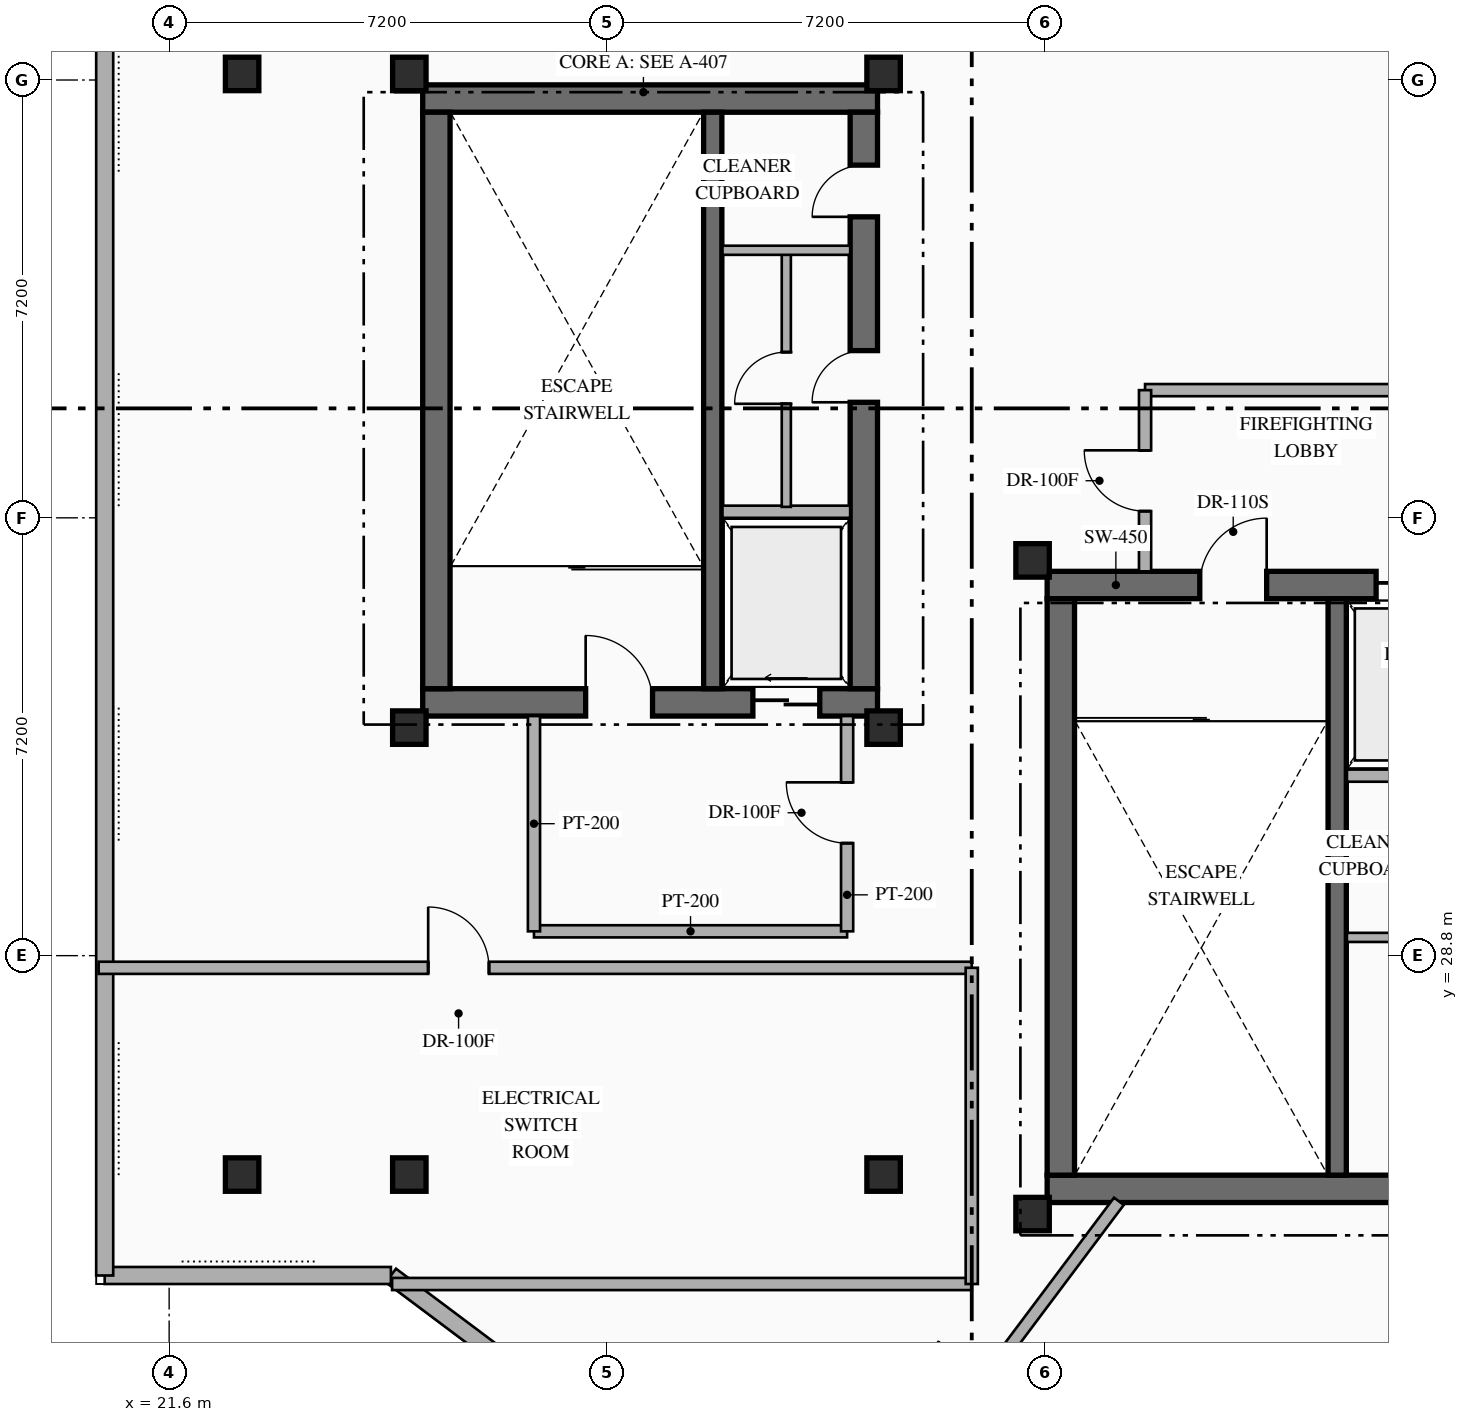
"""IFC4 building model, lengths in metres.
Left out: names, types, materials, properties, quantities, classifications, styles, units other than length and angle.
Written with IfcOpenShell. Run it as: python <this file> out.ifc"""

import sys

from ifc_helpers import new_model, si_unit, direction, frame, frame_2d, origin, origin_2d, place, context, subcontext, project, spatial, rectangle, hollow_rectangle, extrude, element, fill, save


model = new_model("IFC4")
c1 = context("Model", 3, precision=1e-05, world=origin(), true_north=direction((0.0, 1.0)))
c2 = subcontext(c1, "Body", "Model", "MODEL_VIEW")
j1 = project(units=[si_unit("LENGTHUNIT", "METRE"), si_unit("PLANEANGLEUNIT", "RADIAN")], contexts=[c1])
p1 = place(None, origin())
s1 = spatial("IfcSite", under=j1, at=p1, CompositionType="ELEMENT")
p2 = place(p1, origin())
s2 = spatial("IfcBuilding", under=s1, at=p2, CompositionType="ELEMENT")
p3 = place(p2, frame((0.0, 0.0, 289.95)))
s3 = spatial("IfcBuildingStorey", under=s2, at=p3, CompositionType="ELEMENT", Elevation=289.95)
p4 = place(p3, frame((25.77, 32.965, 0.0), z_axis=(0.0, 0.0, 1.0), x_axis=(1.0, 0.0, 0.0)))
e1 = element("IfcWall", 1, at=p4, inside=s3, PredefinedType="SHEAR", context=c2, shape_type="SweptSolid", body=[
    extrude(rectangle(XDim=7.48, YDim=0.45, at=frame_2d((3.74, 0.0))), origin(), (0.0, 0.0, 1.0), 4.2),
])
p5 = place(p4, frame((2.68, 0.0, 0.0)))
e2 = element("IfcOpeningElement", 2, at=p5, cuts=e1, PredefinedType="OPENING", context=c2, shape_type="SweptSolid", body=[
    extrude(rectangle(XDim=1.1, YDim=2.2, at=frame_2d((0.55, 1.1))), frame((0.0, 0.235, 0.0), z_axis=(0.0, -1.0, 0.0), x_axis=(1.0, 0.0, 0.0)), (0.0, 0.0, 1.0), 0.47),
])
p6 = place(p4, frame((5.43, 0.0, 0.0)))
e3 = element("IfcOpeningElement", 3, at=p6, cuts=e1, PredefinedType="OPENING", context=c2, shape_type="SweptSolid", body=[
    extrude(rectangle(XDim=1.1, YDim=2.15, at=frame_2d((0.55, 1.075))), frame((0.0, 0.235, 0.0), z_axis=(0.0, -1.0, 0.0), x_axis=(1.0, 0.0, 0.0)), (0.0, 0.0, 1.0), 0.47),
])
p7 = place(p3, frame((25.77, 42.895, 0.0), z_axis=(0.0, 0.0, 1.0), x_axis=(1.0, 0.0, 0.0)))
e4 = element("IfcWall", 4, at=p7, inside=s3, PredefinedType="SHEAR", context=c2, shape_type="SweptSolid", body=[
    extrude(rectangle(XDim=7.48, YDim=0.45, at=frame_2d((3.74, 0.0))), origin(), (0.0, 0.0, 1.0), 4.2),
])
p8 = place(p3, frame((25.995, 33.19, 0.0), z_axis=(0.0, 0.0, 1.0), x_axis=(0.0, 1.0, 0.0)))
e5 = element("IfcWall", 5, at=p8, inside=s3, PredefinedType="SHEAR", context=c2, shape_type="SweptSolid", body=[
    extrude(rectangle(XDim=9.48, YDim=0.45, at=frame_2d((4.74, 0.0))), origin(), (0.0, 0.0, 1.0), 4.2),
])
p9 = place(p3, frame((33.025, 33.19, 0.0), z_axis=(0.0, 0.0, 1.0), x_axis=(0.0, 1.0, 0.0)))
e6 = element("IfcWall", 6, at=p9, inside=s3, PredefinedType="SHEAR", context=c2, shape_type="SweptSolid", body=[
    extrude(rectangle(XDim=9.48, YDim=0.45, at=frame_2d((4.74, 0.0))), origin(), (0.0, 0.0, 1.0), 4.2),
])
p10 = place(p9, frame((4.71, 0.0, 0.0)))
e7 = element("IfcOpeningElement", 7, at=p10, cuts=e6, PredefinedType="OPENING", context=c2, shape_type="SweptSolid", body=[
    extrude(rectangle(XDim=0.85, YDim=2.08, at=frame_2d((0.425, 1.04))), frame((0.0, 0.235, 0.0), z_axis=(0.0, -1.0, 0.0), x_axis=(1.0, 0.0, 0.0)), (0.0, 0.0, 1.0), 0.47),
])
p11 = place(p9, frame((7.76, 0.0, 0.0)))
e8 = element("IfcOpeningElement", 8, at=p11, cuts=e6, PredefinedType="OPENING", context=c2, shape_type="SweptSolid", body=[
    extrude(rectangle(XDim=0.85, YDim=2.08, at=frame_2d((0.425, 1.04))), frame((0.0, 0.235, 0.0), z_axis=(0.0, -1.0, 0.0), x_axis=(1.0, 0.0, 0.0)), (0.0, 0.0, 1.0), 0.47),
])
p12 = place(p3, frame((30.54, 33.19, 0.0), z_axis=(0.0, 0.0, 1.0), x_axis=(0.0, 1.0, 0.0)))
e9 = element("IfcWall", 9, at=p12, inside=s3, PredefinedType="SHEAR", context=c2, shape_type="SweptSolid", body=[
    extrude(rectangle(XDim=9.48, YDim=0.3, at=frame_2d((4.74, 0.0))), origin(), (0.0, 0.0, 1.0), 4.2),
])
p13 = place(p3, frame((36.04, 24.965, 0.0), z_axis=(0.0, 0.0, 1.0), x_axis=(1.0, 0.0, 0.0)))
e10 = element("IfcWall", 10, at=p13, inside=s3, PredefinedType="SHEAR", context=c2, shape_type="SweptSolid", body=[
    extrude(rectangle(XDim=7.46, YDim=0.45, at=frame_2d((3.73, 0.0))), origin(), (0.0, 0.0, 1.0), 4.2),
])
p14 = place(p3, frame((36.04, 34.895, 0.0), z_axis=(0.0, 0.0, 1.0), x_axis=(1.0, 0.0, 0.0)))
e11 = element("IfcWall", 11, at=p14, inside=s3, PredefinedType="SHEAR", context=c2, shape_type="SweptSolid", body=[
    extrude(rectangle(XDim=7.46, YDim=0.45, at=frame_2d((3.73, 0.0))), origin(), (0.0, 0.0, 1.0), 4.2),
])
p15 = place(p14, frame((2.51, 0.0, 0.0)))
e12 = element("IfcOpeningElement", 12, at=p15, cuts=e11, PredefinedType="OPENING", context=c2, shape_type="SweptSolid", body=[
    extrude(rectangle(XDim=1.1, YDim=2.2, at=frame_2d((0.55, 1.1))), frame((0.0, 0.235, 0.0), z_axis=(0.0, -1.0, 0.0), x_axis=(1.0, 0.0, 0.0)), (0.0, 0.0, 1.0), 0.47),
])
p16 = place(p14, frame((5.41, 0.0, 0.0)))
e13 = element("IfcOpeningElement", 13, at=p16, cuts=e11, PredefinedType="OPENING", context=c2, shape_type="SweptSolid", body=[
    extrude(rectangle(XDim=1.12, YDim=2.15, at=frame_2d((0.56, 1.075))), frame((0.0, 0.235, 0.0), z_axis=(0.0, -1.0, 0.0), x_axis=(1.0, 0.0, 0.0)), (0.0, 0.0, 1.0), 0.47),
])
p17 = place(p3, frame((36.265, 25.19, 0.0), z_axis=(0.0, 0.0, 1.0), x_axis=(0.0, 1.0, 0.0)))
e14 = element("IfcWall", 14, at=p17, inside=s3, PredefinedType="SHEAR", context=c2, shape_type="SweptSolid", body=[
    extrude(rectangle(XDim=9.48, YDim=0.45, at=frame_2d((4.74, 0.0))), origin(), (0.0, 0.0, 1.0), 4.2),
])
p18 = place(p3, frame((40.81, 25.19, 0.0), z_axis=(0.0, 0.0, 1.0), x_axis=(0.0, 1.0, 0.0)))
e15 = element("IfcWall", 15, at=p18, inside=s3, PredefinedType="SHEAR", context=c2, shape_type="SweptSolid", body=[
    extrude(rectangle(XDim=9.48, YDim=0.3, at=frame_2d((4.74, 0.0))), origin(), (0.0, 0.0, 1.0), 4.2),
])
for number, where, z_axis, x_axis in (
    (16, (25.55, 32.55, 0.0), (0.0, 0.0, 1.0), (1.0, 0.0, 0.0)),
    (17, (33.35, 32.55, 0.0), (0.0, 0.0, 1.0), (1.0, 0.0, 0.0)),
    (18, (25.55, 43.3, 0.0), (0.0, 0.0, 1.0), (1.0, 0.0, 0.0)),
    (19, (33.35, 43.3, 0.0), (0.0, 0.0, 1.0), (1.0, 0.0, 0.0)),
    (20, (35.8, 24.55, 0.0), (0.0, 0.0, 1.0), (1.0, 0.0, 0.0)),
    (21, (35.8, 35.3, 0.0), (0.0, 0.0, 1.0), (1.0, 0.0, 0.0)),
    (22, (25.55, 25.2, 0.0), (0.0, 0.0, 1.0), (1.0, 0.0, 0.0)),
    (23, (33.35, 25.2, 0.0), (0.0, 0.0, 1.0), (1.0, 0.0, 0.0)),
    (24, (22.8, 25.2, 0.0), (0.0, 0.0, 1.0), (1.0, 0.0, 0.0)),
    (25, (22.8, 43.3, 0.0), (0.0, 0.0, 1.0), (1.0, 0.0, 0.0)),
):
    element("IfcColumn", number, at=place(p3, frame(where, z_axis=z_axis, x_axis=x_axis)), inside=s3, PredefinedType="COLUMN", context=c2, shape_type="SweptSolid", body=[
        extrude(hollow_rectangle(XDim=0.55, YDim=0.55, WallThickness=0.022, at=origin_2d()), origin(), (0.0, 0.0, 1.0), 3.818),
    ])
p19 = place(p3, frame((52.053, 32.438, 0.0), z_axis=(0.0, 0.0, 1.0), x_axis=(-0.599970072971, -0.800022444397, 0.0)))
e26 = element("IfcWall", 26, at=p19, inside=s3, PredefinedType="STANDARD", context=c2, shape_type="SweptSolid", body=[
    extrude(rectangle(XDim=20.885, YDim=0.28, at=frame_2d((10.442, 0.0))), origin(), (0.0, 0.0, 1.0), 3.85),
])
p20 = place(p3, frame((36.278, 15.267, 0.0), z_axis=(0.0, 0.0, 1.0), x_axis=(-0.80001062348, 0.599985835098, 0.0)))
e27 = element("IfcWall", 27, at=p20, inside=s3, PredefinedType="STANDARD", context=c2, shape_type="SweptSolid", body=[
    extrude(rectangle(XDim=13.789, YDim=0.28, at=frame_2d((6.894, 0.0))), origin(), (0.0, 0.0, 1.0), 3.85),
])
p21 = place(p3, frame((25.247, 23.54, 0.0), z_axis=(0.0, 0.0, 1.0), x_axis=(-1.0, 0.0, 0.0)))
e28 = element("IfcWall", 28, at=p21, inside=s3, PredefinedType="STANDARD", context=c2, shape_type="SweptSolid", body=[
    extrude(rectangle(XDim=4.707, YDim=0.28, at=frame_2d((2.354, 0.0))), origin(), (0.0, 0.0, 1.0), 3.85),
])
p22 = place(p3, frame((20.54, 23.54, 0.0), z_axis=(0.0, 0.0, 1.0), x_axis=(0.0, 1.0, 0.0)))
e29 = element("IfcWall", 29, at=p22, inside=s3, PredefinedType="STANDARD", context=c2, shape_type="SweptSolid", body=[
    extrude(rectangle(XDim=22.002, YDim=0.28, at=frame_2d((11.001, 0.0))), origin(), (0.0, 0.0, 1.0), 3.85),
])
p23 = place(p3, frame((30.7, 36.1, 0.0), z_axis=(0.0, 0.0, 1.0), x_axis=(1.0, 0.0, 0.0)))
e30 = element("IfcWall", 30, at=p23, inside=s3, PredefinedType="STANDARD", context=c2, shape_type="SweptSolid", body=[
    extrude(rectangle(XDim=2.1, YDim=0.2, at=frame_2d((1.05, 0.0))), origin(), (0.0, 0.0, 1.0), 3.85),
])
p24 = place(p3, frame((31.75, 36.18, 0.0), z_axis=(0.0, 0.0, 1.0), x_axis=(0.0, 1.0, 0.0)))
e31 = element("IfcWall", 31, at=p24, inside=s3, PredefinedType="PARTITIONING", context=c2, shape_type="SweptSolid", body=[
    extrude(rectangle(XDim=4.24, YDim=0.15, at=frame_2d((2.12, 0.0))), origin(), (0.0, 0.0, 1.0), 3.85),
])
p25 = place(p24, frame((1.695, 0.0, 0.0)))
e32 = element("IfcOpeningElement", 32, at=p25, cuts=e31, PredefinedType="OPENING", context=c2, shape_type="SweptSolid", body=[
    extrude(rectangle(XDim=0.85, YDim=2.08, at=frame_2d((0.425, 1.04))), frame((0.0, 0.085, 0.0), z_axis=(0.0, -1.0, 0.0), x_axis=(1.0, 0.0, 0.0)), (0.0, 0.0, 1.0), 0.17),
])
p26 = place(p3, frame((30.7, 40.4, 0.0), z_axis=(0.0, 0.0, 1.0), x_axis=(1.0, 0.0, 0.0)))
e33 = element("IfcWall", 33, at=p26, inside=s3, PredefinedType="PARTITIONING", context=c2, shape_type="SweptSolid", body=[
    extrude(rectangle(XDim=2.1, YDim=0.15, at=frame_2d((1.05, 0.0))), origin(), (0.0, 0.0, 1.0), 3.85),
])
p27 = place(p3, frame((40.97, 31.76, 0.0), z_axis=(0.0, 0.0, 1.0), x_axis=(1.0, 0.0, 0.0)))
e34 = element("IfcWall", 34, at=p27, inside=s3, PredefinedType="STANDARD", context=c2, shape_type="SweptSolid", body=[
    extrude(rectangle(XDim=2.08, YDim=0.2, at=frame_2d((1.04, 0.0))), origin(), (0.0, 0.0, 1.0), 3.85),
])
p28 = place(p3, frame((40.97, 29.1, 0.0), z_axis=(0.0, 0.0, 1.0), x_axis=(1.0, 0.0, 0.0)))
e35 = element("IfcWall", 35, at=p28, inside=s3, PredefinedType="PARTITIONING", context=c2, shape_type="SweptSolid", body=[
    extrude(rectangle(XDim=2.08, YDim=0.15, at=frame_2d((1.04, 0.0))), origin(), (0.0, 0.0, 1.0), 3.85),
])
p29 = place(p3, frame((27.6, 29.2, 0.0), z_axis=(0.0, 0.0, 1.0), x_axis=(1.0, 0.0, 0.0)))
e36 = element("IfcWall", 36, at=p29, inside=s3, PredefinedType="STANDARD", context=c2, shape_type="SweptSolid", body=[
    extrude(rectangle(XDim=5.15, YDim=0.2, at=frame_2d((2.575, 0.0))), origin(), (0.0, 0.0, 1.0), 3.85),
])
p30 = place(p3, frame((27.6, 29.2, 0.0), z_axis=(0.0, 0.0, 1.0), x_axis=(0.0, 1.0, 0.0)))
e37 = element("IfcWall", 37, at=p30, inside=s3, PredefinedType="STANDARD", context=c2, shape_type="SweptSolid", body=[
    extrude(rectangle(XDim=3.54, YDim=0.2, at=frame_2d((1.77, 0.0))), origin(), (0.0, 0.0, 1.0), 3.85),
])
p31 = place(p3, frame((32.75, 29.2, 0.0), z_axis=(0.0, 0.0, 1.0), x_axis=(0.0, 1.0, 0.0)))
e38 = element("IfcWall", 38, at=p31, inside=s3, PredefinedType="STANDARD", context=c2, shape_type="SweptSolid", body=[
    extrude(rectangle(XDim=3.54, YDim=0.2, at=frame_2d((1.77, 0.0))), origin(), (0.0, 0.0, 1.0), 3.85),
])
p32 = place(p31, frame((1.45, 0.0, 0.0)))
e39 = element("IfcOpeningElement", 39, at=p32, cuts=e38, PredefinedType="OPENING", context=c2, shape_type="SweptSolid", body=[
    extrude(rectangle(XDim=1.0, YDim=2.2, at=frame_2d((0.5, 1.1))), frame((0.0, 0.11, 0.0), z_axis=(0.0, -1.0, 0.0), x_axis=(1.0, 0.0, 0.0)), (0.0, 0.0, 1.0), 0.22),
])
p33 = place(p3, frame((37.65, 38.1, 0.0), z_axis=(0.0, 0.0, 1.0), x_axis=(1.0, 0.0, 0.0)))
e40 = element("IfcWall", 40, at=p33, inside=s3, PredefinedType="STANDARD", context=c2, shape_type="SweptSolid", body=[
    extrude(rectangle(XDim=5.3, YDim=0.2, at=frame_2d((2.65, 0.0))), origin(), (0.0, 0.0, 1.0), 3.85),
])
p34 = place(p3, frame((37.65, 35.12, 0.0), z_axis=(0.0, 0.0, 1.0), x_axis=(0.0, 1.0, 0.0)))
e41 = element("IfcWall", 41, at=p34, inside=s3, PredefinedType="STANDARD", context=c2, shape_type="SweptSolid", body=[
    extrude(rectangle(XDim=2.98, YDim=0.2, at=frame_2d((1.49, 0.0))), origin(), (0.0, 0.0, 1.0), 3.85),
])
p35 = place(p34, frame((0.99, 0.0, 0.0)))
e42 = element("IfcOpeningElement", 42, at=p35, cuts=e41, PredefinedType="OPENING", context=c2, shape_type="SweptSolid", body=[
    extrude(rectangle(XDim=1.0, YDim=2.2, at=frame_2d((0.5, 1.1))), frame((0.0, 0.11, 0.0), z_axis=(0.0, -1.0, 0.0), x_axis=(1.0, 0.0, 0.0)), (0.0, 0.0, 1.0), 0.22),
])
p36 = place(p3, frame((25.267, 23.4, 0.0), z_axis=(0.0, 0.0, 1.0), x_axis=(1.0, 0.0, 0.0)))
e43 = element("IfcWall", 43, at=p36, inside=s3, PredefinedType="STANDARD", context=c2, shape_type="SweptSolid", body=[
    extrude(rectangle(XDim=9.533, YDim=0.2, at=frame_2d((4.767, 0.0))), origin(), (0.0, 0.0, 1.0), 3.85),
])
p37 = place(p3, frame((20.44, 28.6, 0.0), z_axis=(0.0, 0.0, 1.0), x_axis=(1.0, 0.0, 0.0)))
e44 = element("IfcWall", 44, at=p37, inside=s3, PredefinedType="STANDARD", context=c2, shape_type="SweptSolid", body=[
    extrude(rectangle(XDim=14.36, YDim=0.2, at=frame_2d((7.18, 0.0))), origin(), (0.0, 0.0, 1.0), 3.85),
])
p38 = place(p37, frame((5.42, 0.0, 0.0)))
e45 = element("IfcOpeningElement", 45, at=p38, cuts=e44, PredefinedType="OPENING", context=c2, shape_type="SweptSolid", body=[
    extrude(rectangle(XDim=1.0, YDim=2.2, at=frame_2d((0.5, 1.1))), frame((0.0, 0.11, 0.0), z_axis=(0.0, -1.0, 0.0), x_axis=(1.0, 0.0, 0.0)), (0.0, 0.0, 1.0), 0.22),
])
p39 = place(p3, frame((34.8, 23.4, 0.0), z_axis=(0.0, 0.0, 1.0), x_axis=(0.0, 1.0, 0.0)))
e46 = element("IfcWall", 46, at=p39, inside=s3, PredefinedType="STANDARD", context=c2, shape_type="SweptSolid", body=[
    extrude(rectangle(XDim=5.2, YDim=0.2, at=frame_2d((2.6, 0.0))), origin(), (0.0, 0.0, 1.0), 3.85),
])
p40 = place(p3, frame((32.264, 18.152, 0.0), z_axis=(0.0, 0.0, 1.0), x_axis=(0.600009458235, 0.799992906236, 0.0)))
e47 = element("IfcWall", 47, at=p40, inside=s3, PredefinedType="STANDARD", context=c2, shape_type="SweptSolid", body=[
    extrude(rectangle(XDim=8.26, YDim=0.2, at=frame_2d((4.13, 0.0))), origin(), (0.0, 0.0, 1.0), 3.85),
])
p41 = place(p40, frame((3.63, 0.0, 0.0)))
e48 = element("IfcOpeningElement", 48, at=p41, cuts=e47, PredefinedType="OPENING", context=c2, shape_type="SweptSolid", body=[
    extrude(rectangle(XDim=1.0, YDim=2.2, at=frame_2d((0.5, 1.1))), frame((0.0, 0.11, 0.0), z_axis=(0.0, -1.0, 0.0), x_axis=(1.0, 0.0, 0.0)), (0.0, 0.0, 1.0), 0.22),
])
p42 = place(p5, origin())
e49 = element("IfcDoor", 49, at=p42, inside=s3, OperationType="SINGLE_SWING_LEFT", PredefinedType="DOOR", context=c2, shape_type="SweptSolid", body=[
    extrude(rectangle(XDim=1.1, YDim=2.2, at=frame_2d((0.55, 1.1))), frame((0.0, 0.025, 0.0), z_axis=(0.0, -1.0, 0.0), x_axis=(1.0, 0.0, 0.0)), (0.0, 0.0, 1.0), 0.05),
])
fill(e2, e49)
p43 = place(p6, origin())
e50 = element("IfcDoor", 50, at=p43, inside=s3, OperationType="SLIDING_TO_LEFT", PredefinedType="USERDEFINED", context=c2, shape_type="SweptSolid", body=[
    extrude(rectangle(XDim=1.1, YDim=2.15, at=frame_2d((0.55, 1.075))), frame((0.0, 0.025, 0.0), z_axis=(0.0, -1.0, 0.0), x_axis=(1.0, 0.0, 0.0)), (0.0, 0.0, 1.0), 0.05),
])
fill(e3, e50)
p44 = place(p15, origin())
e51 = element("IfcDoor", 51, at=p44, inside=s3, OperationType="SINGLE_SWING_RIGHT", PredefinedType="DOOR", context=c2, shape_type="SweptSolid", body=[
    extrude(rectangle(XDim=1.1, YDim=2.2, at=frame_2d((0.55, 1.1))), frame((0.0, 0.025, 0.0), z_axis=(0.0, -1.0, 0.0), x_axis=(1.0, 0.0, 0.0)), (0.0, 0.0, 1.0), 0.05),
])
fill(e12, e51)
p45 = place(p16, origin())
e52 = element("IfcDoor", 52, at=p45, inside=s3, OperationType="SLIDING_TO_RIGHT", PredefinedType="USERDEFINED", context=c2, shape_type="SweptSolid", body=[
    extrude(rectangle(XDim=1.12, YDim=2.15, at=frame_2d((0.56, 1.075))), frame((0.0, 0.025, 0.0), z_axis=(0.0, -1.0, 0.0), x_axis=(1.0, 0.0, 0.0)), (0.0, 0.0, 1.0), 0.05),
])
fill(e13, e52)
p46 = place(p10, origin())
e53 = element("IfcDoor", 53, at=p46, inside=s3, OperationType="SINGLE_SWING_LEFT", PredefinedType="DOOR", context=c2, shape_type="SweptSolid", body=[
    extrude(rectangle(XDim=0.85, YDim=2.08, at=frame_2d((0.425, 1.04))), frame((0.0, 0.025, 0.0), z_axis=(0.0, -1.0, 0.0), x_axis=(1.0, 0.0, 0.0)), (0.0, 0.0, 1.0), 0.05),
])
fill(e7, e53)
p47 = place(p11, origin())
e54 = element("IfcDoor", 54, at=p47, inside=s3, OperationType="SINGLE_SWING_LEFT", PredefinedType="DOOR", context=c2, shape_type="SweptSolid", body=[
    extrude(rectangle(XDim=0.85, YDim=2.08, at=frame_2d((0.425, 1.04))), frame((0.0, 0.025, 0.0), z_axis=(0.0, -1.0, 0.0), x_axis=(1.0, 0.0, 0.0)), (0.0, 0.0, 1.0), 0.05),
])
fill(e8, e54)
p48 = place(p25, origin())
e55 = element("IfcDoor", 55, at=p48, inside=s3, OperationType="SINGLE_SWING_LEFT", PredefinedType="DOOR", context=c2, shape_type="SweptSolid", body=[
    extrude(rectangle(XDim=0.85, YDim=2.08, at=frame_2d((0.425, 1.04))), frame((0.0, 0.025, 0.0), z_axis=(0.0, -1.0, 0.0), x_axis=(1.0, 0.0, 0.0)), (0.0, 0.0, 1.0), 0.05),
])
fill(e32, e55)
p49 = place(p32, origin())
e56 = element("IfcDoor", 56, at=p49, inside=s3, OperationType="SINGLE_SWING_RIGHT", PredefinedType="DOOR", context=c2, shape_type="SweptSolid", body=[
    extrude(rectangle(XDim=1.0, YDim=2.2, at=frame_2d((0.5, 1.1))), frame((0.0, 0.025, 0.0), z_axis=(0.0, -1.0, 0.0), x_axis=(1.0, 0.0, 0.0)), (0.0, 0.0, 1.0), 0.05),
])
fill(e39, e56)
p50 = place(p35, origin())
e57 = element("IfcDoor", 57, at=p50, inside=s3, OperationType="SINGLE_SWING_RIGHT", PredefinedType="DOOR", context=c2, shape_type="SweptSolid", body=[
    extrude(rectangle(XDim=1.0, YDim=2.2, at=frame_2d((0.5, 1.1))), frame((0.0, 0.025, 0.0), z_axis=(0.0, -1.0, 0.0), x_axis=(1.0, 0.0, 0.0)), (0.0, 0.0, 1.0), 0.05),
])
fill(e42, e57)
p51 = place(p38, origin())
e58 = element("IfcDoor", 58, at=p51, inside=s3, OperationType="SINGLE_SWING_LEFT", PredefinedType="DOOR", context=c2, shape_type="SweptSolid", body=[
    extrude(rectangle(XDim=1.0, YDim=2.2, at=frame_2d((0.5, 1.1))), frame((0.0, 0.025, 0.0), z_axis=(0.0, -1.0, 0.0), x_axis=(1.0, 0.0, 0.0)), (0.0, 0.0, 1.0), 0.05),
])
fill(e45, e58)
save(model, sys.argv[1])
